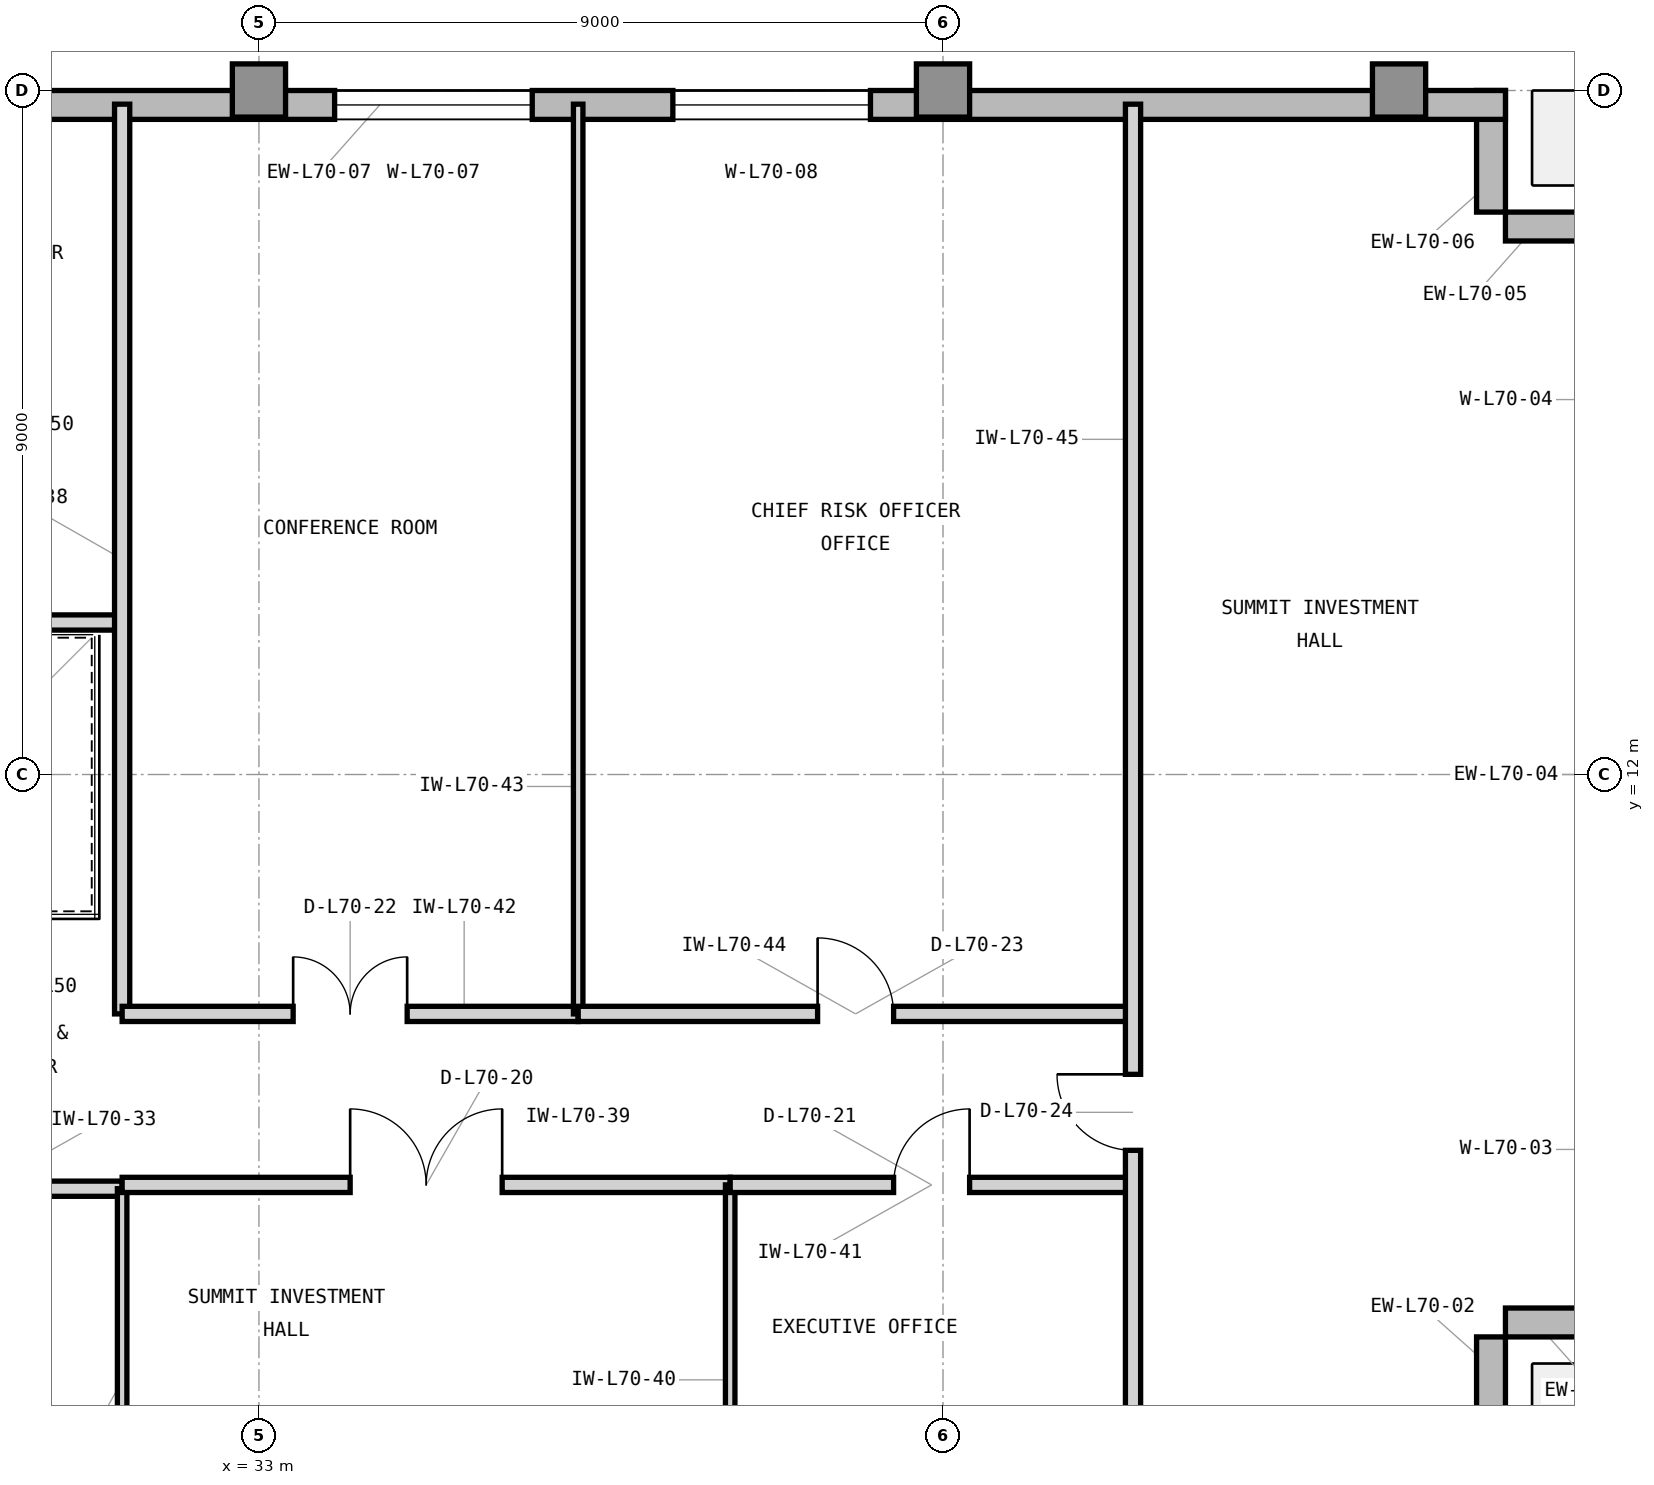
"""IFC4 building model, lengths in metres.
Left out: names, types, materials, properties, quantities, classifications, styles, units other than length and angle.
Written with IfcOpenShell. Run it as: python <this file> out.ifc"""

import sys

from ifc_helpers import new_model, si_unit, direction, frame, frame_2d, origin, origin_2d, place, context, subcontext, project, spatial, rectangle, extrude, element, fill, save


model = new_model("IFC4")
c1 = context("Model", 3, precision=1e-05, world=origin(), true_north=direction((0.0, 1.0)))
c2 = subcontext(c1, "Body", "Model", "MODEL_VIEW")
j1 = project(units=[si_unit("LENGTHUNIT", "METRE"), si_unit("PLANEANGLEUNIT", "RADIAN")], contexts=[c1])
p1 = place(None, origin())
s1 = spatial("IfcSite", under=j1, at=p1, CompositionType="ELEMENT")
p2 = place(p1, origin())
s2 = spatial("IfcBuilding", under=s1, at=p2, CompositionType="ELEMENT")
p3 = place(p2, frame((0.0, 0.0, 285.9)))
s3 = spatial("IfcBuildingStorey", under=s2, at=p3, CompositionType="ELEMENT", Elevation=285.9)
for number, where, z_axis, x_axis in (
    (1, (33.0, 21.0, 0.0), (0.0, 0.0, 1.0), (1.0, 0.0, 0.0)),
    (2, (42.0, 21.0, 0.0), (0.0, 0.0, 1.0), (1.0, 0.0, 0.0)),
    (3, (48.0, 21.0, 0.0), (0.0, 0.0, 1.0), (1.0, 0.0, 0.0)),
):
    element("IfcColumn", number, at=place(p3, frame(where, z_axis=z_axis, x_axis=x_axis)), inside=s3, PredefinedType="COLUMN", context=c2, shape_type="SweptSolid", body=[
        extrude(rectangle(XDim=0.7, YDim=0.7, at=origin_2d()), origin(), (0.0, 0.0, 1.0), 3.9),
    ])
for number, where, z_axis, x_axis in (
    (4, (49.21, 3.0, 0.0), (0.0, 0.0, 1.0), (0.0, 1.0, 0.0)),
    (5, (49.4, 4.79, 0.0), (0.0, 0.0, 1.0), (1.0, 0.0, 0.0)),
    (6, (51.0, 19.21, 0.0), (0.0, 0.0, 1.0), (-1.0, 0.0, 0.0)),
    (7, (49.21, 19.4, 0.0), (0.0, 0.0, 1.0), (0.0, 1.0, 0.0)),
):
    element("IfcWall", number, at=place(p3, frame(where, z_axis=z_axis, x_axis=x_axis)), inside=s3, PredefinedType="STANDARD", context=c2, shape_type="SweptSolid", body=[
        extrude(rectangle(XDim=1.6, YDim=0.38, at=frame_2d((0.8, 0.0))), origin(), (0.0, 0.0, 1.0), 3.715),
    ])
p4 = place(p3, frame((49.4, 20.81, 0.0), z_axis=(0.0, 0.0, 1.0), x_axis=(-1.0, 0.0, 0.0)))
e8 = element("IfcWall", 8, at=p4, inside=s3, PredefinedType="STANDARD", context=c2, shape_type="SweptSolid", body=[
    extrude(rectangle(XDim=29.62, YDim=0.38, at=frame_2d((14.81, 0.0))), origin(), (0.0, 0.0, 1.0), 3.715),
])
p5 = place(p4, frame((22.814, 0.0, 0.8)))
e9 = element("IfcOpeningElement", 9, at=p5, cuts=e8, PredefinedType="OPENING", context=c2, shape_type="SweptSolid", body=[
    extrude(rectangle(XDim=1.9, YDim=2.35, at=frame_2d((0.95, 1.175))), frame((0.0, 0.2, 0.0), z_axis=(0.0, -1.0, 0.0), x_axis=(1.0, 0.0, 0.0)), (0.0, 0.0, 1.0), 0.4),
])
p6 = place(p4, frame((12.804, 0.0, 0.8)))
e10 = element("IfcOpeningElement", 10, at=p6, cuts=e8, PredefinedType="OPENING", context=c2, shape_type="SweptSolid", body=[
    extrude(rectangle(XDim=2.6, YDim=2.35, at=frame_2d((1.3, 1.175))), frame((0.0, 0.2, 0.0), z_axis=(0.0, -1.0, 0.0), x_axis=(1.0, 0.0, 0.0)), (0.0, 0.0, 1.0), 0.4),
])
p7 = place(p4, frame((8.354, 0.0, 0.8)))
e11 = element("IfcOpeningElement", 11, at=p7, cuts=e8, PredefinedType="OPENING", context=c2, shape_type="SweptSolid", body=[
    extrude(rectangle(XDim=2.6, YDim=2.35, at=frame_2d((1.3, 1.175))), frame((0.0, 0.2, 0.0), z_axis=(0.0, -1.0, 0.0), x_axis=(1.0, 0.0, 0.0)), (0.0, 0.0, 1.0), 0.4),
])
p8 = place(p3, frame((23.85, 6.55, 0.0), z_axis=(0.0, 0.0, 1.0), x_axis=(1.0, 0.0, 0.0)))
e12 = element("IfcWall", 12, at=p8, inside=s3, PredefinedType="PARTITIONING", context=c2, shape_type="SweptSolid", body=[
    extrude(rectangle(XDim=7.35, YDim=0.2, at=frame_2d((3.675, 0.0))), origin(), (0.0, 0.0, 1.0), 3.705),
])
p9 = place(p8, frame((2.8, 0.0, 0.0)))
e13 = element("IfcOpeningElement", 13, at=p9, cuts=e12, PredefinedType="OPENING", context=c2, shape_type="SweptSolid", body=[
    extrude(rectangle(XDim=1.0, YDim=2.15, at=frame_2d((0.5, 1.075))), frame((0.0, 0.11, 0.0), z_axis=(0.0, -1.0, 0.0), x_axis=(1.0, 0.0, 0.0)), (0.0, 0.0, 1.0), 0.22),
])
p10 = place(p3, frame((31.2, 3.18, 0.0), z_axis=(0.0, 0.0, 1.0), x_axis=(0.0, 1.0, 0.0)))
e14 = element("IfcWall", 14, at=p10, inside=s3, PredefinedType="PARTITIONING", context=c2, shape_type="SweptSolid", body=[
    extrude(rectangle(XDim=3.37, YDim=0.125, at=frame_2d((1.685, 0.0))), origin(), (0.0, 0.0, 1.0), 3.705),
])
p11 = place(p3, frame((26.9, 14.0, 0.0), z_axis=(0.0, 0.0, 1.0), x_axis=(1.0, 0.0, 0.0)))
e15 = element("IfcWall", 15, at=p11, inside=s3, PredefinedType="PARTITIONING", context=c2, shape_type="SweptSolid", body=[
    extrude(rectangle(XDim=4.3, YDim=0.2, at=frame_2d((2.15, 0.0))), origin(), (0.0, 0.0, 1.0), 3.705),
])
p12 = place(p3, frame((31.2, 8.85, 0.0), z_axis=(0.0, 0.0, 1.0), x_axis=(0.0, 1.0, 0.0)))
e16 = element("IfcWall", 16, at=p12, inside=s3, PredefinedType="PARTITIONING", context=c2, shape_type="SweptSolid", body=[
    extrude(rectangle(XDim=11.97, YDim=0.2, at=frame_2d((5.985, 0.0))), origin(), (0.0, 0.0, 1.0), 3.705),
])
p13 = place(p3, frame((31.2, 6.6, 0.0), z_axis=(0.0, 0.0, 1.0), x_axis=(1.0, 0.0, 0.0)))
e17 = element("IfcWall", 17, at=p13, inside=s3, PredefinedType="PARTITIONING", context=c2, shape_type="SweptSolid", body=[
    extrude(rectangle(XDim=8.0, YDim=0.2, at=frame_2d((4.0, 0.0))), origin(), (0.0, 0.0, 1.0), 3.705),
])
p14 = place(p13, frame((3.0, 0.0, 0.0)))
e18 = element("IfcOpeningElement", 18, at=p14, cuts=e17, PredefinedType="OPENING", context=c2, shape_type="SweptSolid", body=[
    extrude(rectangle(XDim=2.0, YDim=2.5, at=frame_2d((1.0, 1.25))), frame((0.0, 0.11, 0.0), z_axis=(0.0, -1.0, 0.0), x_axis=(1.0, 0.0, 0.0)), (0.0, 0.0, 1.0), 0.22),
])
p15 = place(p3, frame((39.2, 3.18, 0.0), z_axis=(0.0, 0.0, 1.0), x_axis=(0.0, 1.0, 0.0)))
e19 = element("IfcWall", 19, at=p15, inside=s3, PredefinedType="PARTITIONING", context=c2, shape_type="SweptSolid", body=[
    extrude(rectangle(XDim=3.42, YDim=0.125, at=frame_2d((1.71, 0.0))), origin(), (0.0, 0.0, 1.0), 3.705),
])
p16 = place(p3, frame((39.2, 6.6, 0.0), z_axis=(0.0, 0.0, 1.0), x_axis=(1.0, 0.0, 0.0)))
e20 = element("IfcWall", 20, at=p16, inside=s3, PredefinedType="PARTITIONING", context=c2, shape_type="SweptSolid", body=[
    extrude(rectangle(XDim=5.3, YDim=0.2, at=frame_2d((2.65, 0.0))), origin(), (0.0, 0.0, 1.0), 3.705),
])
p17 = place(p16, frame((2.15, 0.0, 0.0)))
e21 = element("IfcOpeningElement", 21, at=p17, cuts=e20, PredefinedType="OPENING", context=c2, shape_type="SweptSolid", body=[
    extrude(rectangle(XDim=1.0, YDim=2.15, at=frame_2d((0.5, 1.075))), frame((0.0, 0.11, 0.0), z_axis=(0.0, -1.0, 0.0), x_axis=(1.0, 0.0, 0.0)), (0.0, 0.0, 1.0), 0.22),
])
p18 = place(p3, frame((31.2, 8.85, 0.0), z_axis=(0.0, 0.0, 1.0), x_axis=(1.0, 0.0, 0.0)))
e22 = element("IfcWall", 22, at=p18, inside=s3, PredefinedType="PARTITIONING", context=c2, shape_type="SweptSolid", body=[
    extrude(rectangle(XDim=6.0, YDim=0.2, at=frame_2d((3.0, 0.0))), origin(), (0.0, 0.0, 1.0), 3.705),
])
p19 = place(p18, frame((2.25, 0.0, 0.0)))
e23 = element("IfcOpeningElement", 23, at=p19, cuts=e22, PredefinedType="OPENING", context=c2, shape_type="SweptSolid", body=[
    extrude(rectangle(XDim=1.5, YDim=2.3, at=frame_2d((0.75, 1.15))), frame((0.0, 0.11, 0.0), z_axis=(0.0, -1.0, 0.0), x_axis=(1.0, 0.0, 0.0)), (0.0, 0.0, 1.0), 0.22),
])
p20 = place(p3, frame((37.2, 8.85, 0.0), z_axis=(0.0, 0.0, 1.0), x_axis=(0.0, 1.0, 0.0)))
e24 = element("IfcWall", 24, at=p20, inside=s3, PredefinedType="PARTITIONING", context=c2, shape_type="SweptSolid", body=[
    extrude(rectangle(XDim=11.97, YDim=0.125, at=frame_2d((5.985, 0.0))), origin(), (0.0, 0.0, 1.0), 3.705),
])
p21 = place(p3, frame((37.2, 8.85, 0.0), z_axis=(0.0, 0.0, 1.0), x_axis=(1.0, 0.0, 0.0)))
e25 = element("IfcWall", 25, at=p21, inside=s3, PredefinedType="PARTITIONING", context=c2, shape_type="SweptSolid", body=[
    extrude(rectangle(XDim=7.3, YDim=0.2, at=frame_2d((3.65, 0.0))), origin(), (0.0, 0.0, 1.0), 3.705),
])
p22 = place(p21, frame((3.15, 0.0, 0.0)))
e26 = element("IfcOpeningElement", 26, at=p22, cuts=e25, PredefinedType="OPENING", context=c2, shape_type="SweptSolid", body=[
    extrude(rectangle(XDim=1.0, YDim=2.15, at=frame_2d((0.5, 1.075))), frame((0.0, 0.11, 0.0), z_axis=(0.0, -1.0, 0.0), x_axis=(1.0, 0.0, 0.0)), (0.0, 0.0, 1.0), 0.22),
])
p23 = place(p3, frame((44.5, 3.18, 0.0), z_axis=(0.0, 0.0, 1.0), x_axis=(0.0, 1.0, 0.0)))
e27 = element("IfcWall", 27, at=p23, inside=s3, PredefinedType="PARTITIONING", context=c2, shape_type="SweptSolid", body=[
    extrude(rectangle(XDim=17.64, YDim=0.2, at=frame_2d((8.82, 0.0))), origin(), (0.0, 0.0, 1.0), 3.705),
])
p24 = place(p23, frame((3.875, 0.0, 0.0)))
e28 = element("IfcOpeningElement", 28, at=p24, cuts=e27, PredefinedType="OPENING", context=c2, shape_type="SweptSolid", body=[
    extrude(rectangle(XDim=1.0, YDim=2.15, at=frame_2d((0.5, 1.075))), frame((0.0, 0.11, 0.0), z_axis=(0.0, -1.0, 0.0), x_axis=(1.0, 0.0, 0.0)), (0.0, 0.0, 1.0), 0.22),
])
p25 = place(p14, origin())
e29 = element("IfcDoor", 29, at=p25, inside=s3, OperationType="DOUBLE_DOOR_SINGLE_SWING", PredefinedType="DOOR", context=c2, shape_type="SweptSolid", body=[
    extrude(rectangle(XDim=2.0, YDim=2.5, at=frame_2d((1.0, 1.25))), frame((0.0, 0.025, 0.0), z_axis=(0.0, -1.0, 0.0), x_axis=(1.0, 0.0, 0.0)), (0.0, 0.0, 1.0), 0.05),
])
fill(e18, e29)
p26 = place(p17, origin())
e30 = element("IfcDoor", 30, at=p26, inside=s3, OperationType="SINGLE_SWING_RIGHT", PredefinedType="DOOR", context=c2, shape_type="SweptSolid", body=[
    extrude(rectangle(XDim=1.0, YDim=2.15, at=frame_2d((0.5, 1.075))), frame((0.0, 0.025, 0.0), z_axis=(0.0, -1.0, 0.0), x_axis=(1.0, 0.0, 0.0)), (0.0, 0.0, 1.0), 0.05),
])
fill(e21, e30)
p27 = place(p19, origin())
e31 = element("IfcDoor", 31, at=p27, inside=s3, OperationType="DOUBLE_DOOR_SINGLE_SWING", PredefinedType="DOOR", context=c2, shape_type="SweptSolid", body=[
    extrude(rectangle(XDim=1.5, YDim=2.3, at=frame_2d((0.75, 1.15))), frame((0.0, 0.025, 0.0), z_axis=(0.0, -1.0, 0.0), x_axis=(1.0, 0.0, 0.0)), (0.0, 0.0, 1.0), 0.05),
])
fill(e23, e31)
p28 = place(p22, origin())
e32 = element("IfcDoor", 32, at=p28, inside=s3, OperationType="SINGLE_SWING_LEFT", PredefinedType="DOOR", context=c2, shape_type="SweptSolid", body=[
    extrude(rectangle(XDim=1.0, YDim=2.15, at=frame_2d((0.5, 1.075))), frame((0.0, 0.025, 0.0), z_axis=(0.0, -1.0, 0.0), x_axis=(1.0, 0.0, 0.0)), (0.0, 0.0, 1.0), 0.05),
])
fill(e26, e32)
p29 = place(p24, origin())
e33 = element("IfcDoor", 33, at=p29, inside=s3, OperationType="SINGLE_SWING_RIGHT", PredefinedType="DOOR", context=c2, shape_type="SweptSolid", body=[
    extrude(rectangle(XDim=1.0, YDim=2.15, at=frame_2d((0.5, 1.075))), frame((0.0, 0.025, 0.0), z_axis=(0.0, -1.0, 0.0), x_axis=(1.0, 0.0, 0.0)), (0.0, 0.0, 1.0), 0.05),
])
fill(e28, e33)
p30 = place(p6, origin())
e34 = element("IfcWindow", 34, at=p30, inside=s3, PartitioningType="SINGLE_PANEL", PredefinedType="WINDOW", context=c2, shape_type="SweptSolid", body=[
    extrude(rectangle(XDim=2.6, YDim=2.35, at=frame_2d((1.3, 1.175))), frame((0.0, 0.11, 0.0), z_axis=(0.0, -1.0, 0.0), x_axis=(1.0, 0.0, 0.0)), (0.0, 0.0, 1.0), 0.06),
])
fill(e10, e34)
p31 = place(p7, origin())
e35 = element("IfcWindow", 35, at=p31, inside=s3, PartitioningType="SINGLE_PANEL", PredefinedType="WINDOW", context=c2, shape_type="SweptSolid", body=[
    extrude(rectangle(XDim=2.6, YDim=2.35, at=frame_2d((1.3, 1.175))), frame((0.0, 0.11, 0.0), z_axis=(0.0, -1.0, 0.0), x_axis=(1.0, 0.0, 0.0)), (0.0, 0.0, 1.0), 0.06),
])
fill(e11, e35)
save(model, sys.argv[1])
